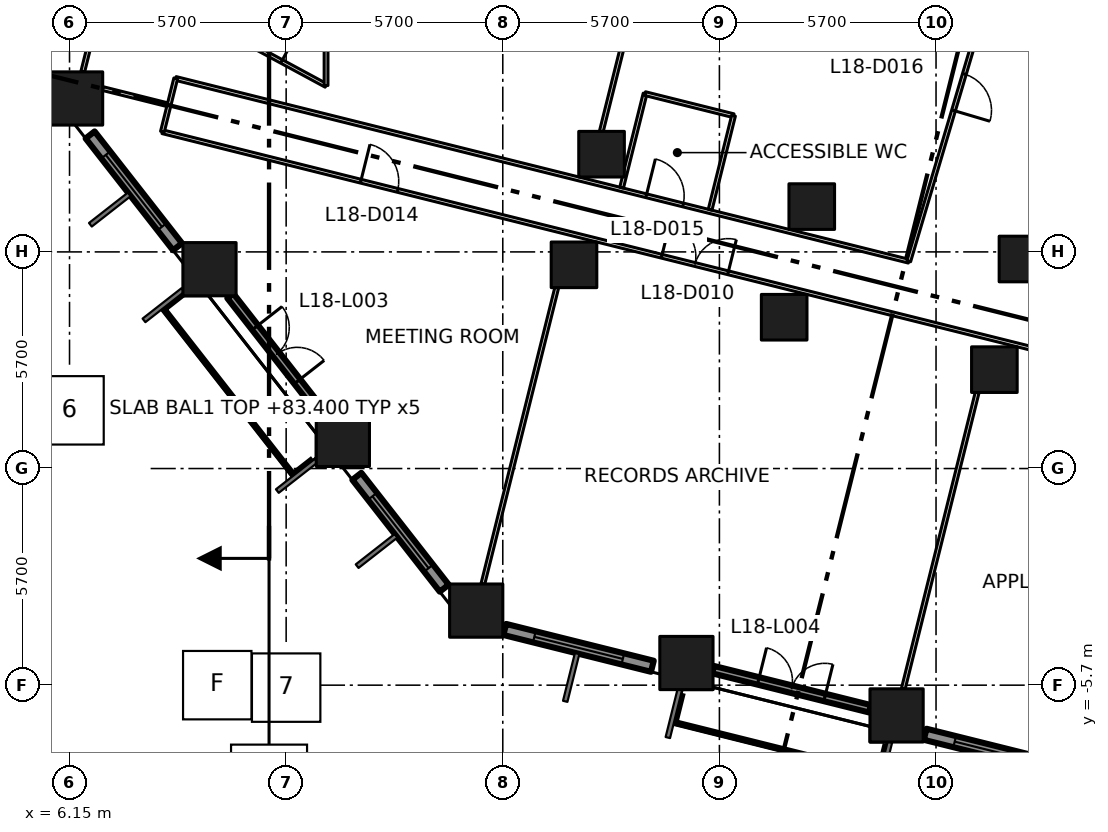
"""IFC4 building model, lengths in metres.
Left out: names, types, materials, properties, quantities, classifications, styles, units other than length and angle.
Written with IfcOpenShell. Run it as: python <this file> out.ifc"""

import sys

from ifc_helpers import new_model, si_unit, direction, frame, frame_2d, origin, origin_2d, place, context, subcontext, project, spatial, rectangle, extrude, element, fill, save


model = new_model("IFC4")
c1 = context("Model", 3, precision=1e-05, world=origin(), true_north=direction((0.0, 1.0)))
c2 = subcontext(c1, "Body", "Model", "MODEL_VIEW")
j1 = project(units=[si_unit("LENGTHUNIT", "METRE"), si_unit("PLANEANGLEUNIT", "RADIAN")], contexts=[c1])
p1 = place(None, origin())
s1 = spatial("IfcSite", under=j1, at=p1, CompositionType="ELEMENT")
p2 = place(p1, origin())
s2 = spatial("IfcBuilding", under=s1, at=p2, CompositionType="ELEMENT")
p3 = place(p2, frame((0.0, 0.0, 83.4)))
s3 = spatial("IfcBuildingStorey", under=s2, at=p3, CompositionType="ELEMENT", Elevation=83.4)
for number, where, z_axis, x_axis in (
    (1, (16.851, -3.738, 0.0), (0.0, 0.0, 1.0), (1.0, 0.0, 0.0)),
    (2, (13.342, 0.754, 0.0), (0.0, 0.0, 1.0), (1.0, 0.0, 0.0)),
    (3, (9.833, 5.245, 0.0), (0.0, 0.0, 1.0), (1.0, 0.0, 0.0)),
    (4, (6.323, 9.737, 0.0), (0.0, 0.0, 1.0), (1.0, 0.0, 0.0)),
    (5, (22.382, -5.117, 0.0), (0.0, 0.0, 1.0), (1.0, 0.0, 0.0)),
    (6, (27.912, -6.496, 0.0), (0.0, 0.0, 1.0), (1.0, 0.0, 0.0)),
):
    element("IfcColumn", number, at=place(p3, frame(where, z_axis=z_axis, x_axis=x_axis)), inside=s3, PredefinedType="COLUMN", context=c2, shape_type="SweptSolid", body=[
        extrude(rectangle(XDim=1.4, YDim=1.4, at=origin_2d()), origin(), (0.0, 0.0, 1.0), 4.2),
    ])
for number, where, z_axis, x_axis in (
    (7, (19.424, 5.36, 0.0), (0.0, 0.0, 1.0), (1.0, 0.0, 0.0)),
    (8, (24.954, 3.981, 0.0), (0.0, 0.0, 1.0), (1.0, 0.0, 0.0)),
    (9, (30.485, 2.602, 0.0), (0.0, 0.0, 1.0), (1.0, 0.0, 0.0)),
    (10, (20.149, 8.271, 0.0), (0.0, 0.0, 1.0), (1.0, 0.0, 0.0)),
    (11, (25.68, 6.892, 0.0), (0.0, 0.0, 1.0), (1.0, 0.0, 0.0)),
    (12, (31.211, 5.513, 0.0), (0.0, 0.0, 1.0), (1.0, 0.0, 0.0)),
):
    element("IfcColumn", number, at=place(p3, frame(where, z_axis=z_axis, x_axis=x_axis)), inside=s3, PredefinedType="COLUMN", context=c2, shape_type="SweptSolid", body=[
        extrude(rectangle(XDim=1.2, YDim=1.2, at=origin_2d()), origin(), (0.0, 0.0, 1.0), 4.2),
    ])
p4 = place(p3, frame((6.692, 8.778, 0.0), z_axis=(0.0, 0.0, 1.0), x_axis=(0.615767067156, -0.787928244833, 0.0)))
e13 = element("IfcWall", 13, at=p4, inside=s3, PredefinedType="SOLIDWALL", context=c2, shape_type="SweptSolid", body=[
    extrude(rectangle(XDim=3.735, YDim=0.3, at=frame_2d((1.868, 0.0))), origin(), (0.0, 0.0, 1.0), 3.1),
])
p5 = place(p4, frame((0.668, 0.0, 0.8)))
e14 = element("IfcOpeningElement", 14, at=p5, cuts=e13, PredefinedType="OPENING", context=c2, shape_type="SweptSolid", body=[
    extrude(rectangle(XDim=2.4, YDim=2.1, at=frame_2d((1.2, 1.05))), frame((0.0, 0.16, 0.0), z_axis=(0.0, -1.0, 0.0), x_axis=(1.0, 0.0, 0.0)), (0.0, 0.0, 1.0), 0.32),
])
p6 = place(p3, frame((10.38, 4.545, 0.0), z_axis=(0.0, 0.0, 1.0), x_axis=(0.615697185896, -0.787982852148, 0.0)))
e15 = element("IfcWall", 15, at=p6, inside=s3, PredefinedType="SOLIDWALL", context=c2, shape_type="SweptSolid", body=[
    extrude(rectangle(XDim=3.922, YDim=0.2, at=frame_2d((1.961, 0.0))), origin(), (0.0, 0.0, 1.0), 3.1),
])
p7 = place(p6, frame((1.061, 0.0, 0.0)))
e16 = element("IfcOpeningElement", 16, at=p7, cuts=e15, PredefinedType="OPENING", context=c2, shape_type="SweptSolid", body=[
    extrude(rectangle(XDim=1.8, YDim=2.9, at=frame_2d((0.9, 1.45))), frame((0.0, 0.11, 0.0), z_axis=(0.0, -1.0, 0.0), x_axis=(1.0, 0.0, 0.0)), (0.0, 0.0, 1.0), 0.22),
])
p8 = place(p3, frame((8.89, 4.292, 0.0), z_axis=(0.0, 0.0, 1.0), x_axis=(0.615636085037, -0.788030590016, 0.0)))
e17 = element("IfcWall", 17, at=p8, inside=s3, PredefinedType="SOLIDWALL", context=c2, shape_type="SweptSolid", body=[
    extrude(rectangle(XDim=5.359, YDim=0.4, at=frame_2d((2.679, 0.0))), origin(), (0.0, 0.0, 1.0), 0.3),
])
p9 = place(p3, frame((13.71, -0.205, 0.0), z_axis=(0.0, 0.0, 1.0), x_axis=(0.615798780214, -0.787903460004, 0.0)))
e18 = element("IfcWall", 18, at=p9, inside=s3, PredefinedType="SOLIDWALL", context=c2, shape_type="SweptSolid", body=[
    extrude(rectangle(XDim=3.735, YDim=0.3, at=frame_2d((1.868, 0.0))), origin(), (0.0, 0.0, 1.0), 3.1),
])
p10 = place(p9, frame((0.667, 0.0, 0.8)))
e19 = element("IfcOpeningElement", 19, at=p10, cuts=e18, PredefinedType="OPENING", context=c2, shape_type="SweptSolid", body=[
    extrude(rectangle(XDim=2.4, YDim=2.1, at=frame_2d((1.2, 1.05))), frame((0.0, 0.16, 0.0), z_axis=(0.0, -1.0, 0.0), x_axis=(1.0, 0.0, 0.0)), (0.0, 0.0, 1.0), 0.32),
])
p11 = place(p3, frame((17.602, -4.234, 0.0), z_axis=(0.0, 0.0, 1.0), x_axis=(0.970260773365, -0.242062040951, 0.0)))
e20 = element("IfcWall", 20, at=p11, inside=s3, PredefinedType="SOLIDWALL", context=c2, shape_type="SweptSolid", body=[
    extrude(rectangle(XDim=4.003, YDim=0.3, at=frame_2d((2.001, 0.0))), origin(), (0.0, 0.0, 1.0), 3.1),
])
p12 = place(p11, frame((0.802, 0.0, 0.8)))
e21 = element("IfcOpeningElement", 21, at=p12, cuts=e20, PredefinedType="OPENING", context=c2, shape_type="SweptSolid", body=[
    extrude(rectangle(XDim=2.4, YDim=2.1, at=frame_2d((1.2, 1.05))), frame((0.0, 0.16, 0.0), z_axis=(0.0, -1.0, 0.0), x_axis=(1.0, 0.0, 0.0)), (0.0, 0.0, 1.0), 0.32),
])
p13 = place(p3, frame((23.082, -5.291, 0.0), z_axis=(0.0, 0.0, 1.0), x_axis=(0.970277311249, -0.241995742265, 0.0)))
e22 = element("IfcWall", 22, at=p13, inside=s3, PredefinedType="SOLIDWALL", context=c2, shape_type="SweptSolid", body=[
    extrude(rectangle(XDim=4.256, YDim=0.2, at=frame_2d((2.128, 0.0))), origin(), (0.0, 0.0, 1.0), 3.1),
])
p14 = place(p13, frame((1.228, 0.0, 0.0)))
e23 = element("IfcOpeningElement", 23, at=p14, cuts=e22, PredefinedType="OPENING", context=c2, shape_type="SweptSolid", body=[
    extrude(rectangle(XDim=1.8, YDim=2.9, at=frame_2d((0.9, 1.45))), frame((0.0, 0.11, 0.0), z_axis=(0.0, -1.0, 0.0), x_axis=(1.0, 0.0, 0.0)), (0.0, 0.0, 1.0), 0.22),
])
p15 = place(p3, frame((22.225, -6.448, 0.0), z_axis=(0.0, 0.0, 1.0), x_axis=(0.970268314528, -0.242031811592, 0.0)))
e24 = element("IfcWall", 24, at=p15, inside=s3, PredefinedType="SOLIDWALL", context=c2, shape_type="SweptSolid", body=[
    extrude(rectangle(XDim=5.359, YDim=0.4, at=frame_2d((2.68, 0.0))), origin(), (0.0, 0.0, 1.0), 0.3),
])
p16 = place(p3, frame((28.663, -6.992, 0.0), z_axis=(0.0, 0.0, 1.0), x_axis=(0.970318045095, -0.24183236211, 0.0)))
e25 = element("IfcWall", 25, at=p16, inside=s3, PredefinedType="SOLIDWALL", context=c2, shape_type="SweptSolid", body=[
    extrude(rectangle(XDim=4.003, YDim=0.3, at=frame_2d((2.001, 0.0))), origin(), (0.0, 0.0, 1.0), 3.1),
])
p17 = place(p16, frame((0.802, 0.0, 0.8)))
e26 = element("IfcOpeningElement", 26, at=p17, cuts=e25, PredefinedType="OPENING", context=c2, shape_type="SweptSolid", body=[
    extrude(rectangle(XDim=2.4, YDim=2.1, at=frame_2d((1.2, 1.05))), frame((0.0, 0.16, 0.0), z_axis=(0.0, -1.0, 0.0), x_axis=(1.0, 0.0, 0.0)), (0.0, 0.0, 1.0), 0.32),
])
p18 = place(p3, frame((8.594, 8.862, 0.0), z_axis=(0.0, 0.0, 1.0), x_axis=(0.970293746648, -0.241929835316, 0.0)))
e27 = element("IfcWall", 27, at=p18, inside=s3, PredefinedType="PARTITIONING", context=c2, shape_type="SweptSolid", body=[
    extrude(rectangle(XDim=68.375, YDim=0.1, at=frame_2d((34.188, 0.0))), origin(), (0.0, 0.0, 1.0), 3.9),
])
p19 = place(p18, frame((40.94, 0.0, 0.0)))
e28 = element("IfcOpeningElement", 28, at=p19, cuts=e27, PredefinedType="OPENING", context=c2, shape_type="SweptSolid", body=[
    extrude(rectangle(XDim=1.8, YDim=2.1, at=frame_2d((0.9, 1.05))), frame((0.0, 0.06, 0.0), z_axis=(0.0, -1.0, 0.0), x_axis=(1.0, 0.0, 0.0)), (0.0, 0.0, 1.0), 0.12),
])
p20 = place(p18, frame((47.941, 0.0, 0.0)))
e29 = element("IfcOpeningElement", 29, at=p20, cuts=e27, PredefinedType="OPENING", context=c2, shape_type="SweptSolid", body=[
    extrude(rectangle(XDim=1.8, YDim=2.1, at=frame_2d((0.9, 1.05))), frame((0.0, 0.06, 0.0), z_axis=(0.0, -1.0, 0.0), x_axis=(1.0, 0.0, 0.0)), (0.0, 0.0, 1.0), 0.12),
])
p21 = place(p18, frame((58.94, 0.0, 0.0)))
e30 = element("IfcOpeningElement", 30, at=p21, cuts=e27, PredefinedType="OPENING", context=c2, shape_type="SweptSolid", body=[
    extrude(rectangle(XDim=1.0, YDim=2.1, at=frame_2d((0.5, 1.05))), frame((0.0, 0.06, 0.0), z_axis=(0.0, -1.0, 0.0), x_axis=(1.0, 0.0, 0.0)), (0.0, 0.0, 1.0), 0.12),
])
p22 = place(p18, frame((13.54, 0.0, 0.0)))
e31 = element("IfcOpeningElement", 31, at=p22, cuts=e27, PredefinedType="OPENING", context=c2, shape_type="SweptSolid", body=[
    extrude(rectangle(XDim=1.8, YDim=2.1, at=frame_2d((0.9, 1.05))), frame((0.0, 0.06, 0.0), z_axis=(0.0, -1.0, 0.0), x_axis=(1.0, 0.0, 0.0)), (0.0, 0.0, 1.0), 0.12),
])
p23 = place(p18, frame((25.24, 0.0, 0.0)))
e32 = element("IfcOpeningElement", 32, at=p23, cuts=e27, PredefinedType="OPENING", context=c2, shape_type="SweptSolid", body=[
    extrude(rectangle(XDim=1.8, YDim=2.1, at=frame_2d((0.9, 1.05))), frame((0.0, 0.06, 0.0), z_axis=(0.0, -1.0, 0.0), x_axis=(1.0, 0.0, 0.0)), (0.0, 0.0, 1.0), 0.12),
])
p24 = place(p18, frame((5.38, 0.0, 0.0)))
e33 = element("IfcOpeningElement", 33, at=p24, cuts=e27, PredefinedType="OPENING", context=c2, shape_type="SweptSolid", body=[
    extrude(rectangle(XDim=1.0, YDim=2.1, at=frame_2d((0.5, 1.05))), frame((0.0, 0.06, 0.0), z_axis=(0.0, -1.0, 0.0), x_axis=(1.0, 0.0, 0.0)), (0.0, 0.0, 1.0), 0.12),
])
p25 = place(p3, frame((8.944, 10.264, 0.0), z_axis=(0.0, 0.0, 1.0), x_axis=(0.970300504447, -0.241902730595, 0.0)))
e34 = element("IfcWall", 34, at=p25, inside=s3, PredefinedType="PARTITIONING", context=c2, shape_type="SweptSolid", body=[
    extrude(rectangle(XDim=19.879, YDim=0.1, at=frame_2d((9.939, 0.0))), origin(), (0.0, 0.0, 1.0), 3.9),
])
p26 = place(p25, frame((12.759, 0.0, 0.0)))
e35 = element("IfcOpeningElement", 35, at=p26, cuts=e34, PredefinedType="OPENING", context=c2, shape_type="SweptSolid", body=[
    extrude(rectangle(XDim=1.0, YDim=2.1, at=frame_2d((0.5, 1.05))), frame((0.0, 0.06, 0.0), z_axis=(0.0, -1.0, 0.0), x_axis=(1.0, 0.0, 0.0)), (0.0, 0.0, 1.0), 0.12),
])
p27 = place(p3, frame((8.944, 10.264, 0.0), z_axis=(0.0, 0.0, 1.0), x_axis=(-0.242297077633, -0.970202105837, 0.0)))
e36 = element("IfcWall", 36, at=p27, inside=s3, PredefinedType="PARTITIONING", context=c2, shape_type="SweptSolid", body=[
    extrude(rectangle(XDim=1.445, YDim=0.1, at=frame_2d((0.722, 0.0))), origin(), (0.0, 0.0, 1.0), 3.9),
])
p28 = place(p3, frame((9.9, 11.7, 0.0), z_axis=(0.0, 0.0, 1.0), x_axis=(0.87965147249, -0.475618846291, 0.0)))
e37 = element("IfcWall", 37, at=p28, inside=s3, PredefinedType="PARTITIONING", context=c2, shape_type="SweptSolid", body=[
    extrude(rectangle(XDim=3.41, YDim=0.1, at=frame_2d((1.705, 0.0))), origin(), (0.0, 0.0, 1.0), 3.9),
])
p29 = place(p28, frame((1.08, 0.0, 0.0)))
e38 = element("IfcOpeningElement", 38, at=p29, cuts=e37, PredefinedType="OPENING", context=c2, shape_type="SweptSolid", body=[
    extrude(rectangle(XDim=1.0, YDim=2.1, at=frame_2d((0.5, 1.05))), frame((0.0, 0.06, 0.0), z_axis=(0.0, -1.0, 0.0), x_axis=(1.0, 0.0, 0.0)), (0.0, 0.0, 1.0), 0.12),
])
p30 = place(p3, frame((12.9, 10.078, 0.0), z_axis=(0.0, 0.0, 1.0), x_axis=(0.0, 1.0, 0.0)))
e39 = element("IfcWall", 39, at=p30, inside=s3, PredefinedType="PARTITIONING", context=c2, shape_type="SweptSolid", body=[
    extrude(rectangle(XDim=4.022, YDim=0.1, at=frame_2d((2.011, 0.0))), origin(), (0.0, 0.0, 1.0), 3.9),
])
p31 = place(p3, frame((30.8, 14.1, 0.0), z_axis=(0.0, 0.0, 1.0), x_axis=(-0.284664373847, -0.95862724469, 0.0)))
e40 = element("IfcWall", 40, at=p31, inside=s3, PredefinedType="PARTITIONING", context=c2, shape_type="SweptSolid", body=[
    extrude(rectangle(XDim=9.018, YDim=0.1, at=frame_2d((4.509, 0.0))), origin(), (0.0, 0.0, 1.0), 3.9),
])
p32 = place(p31, frame((3.88, 0.0, 0.0)))
e41 = element("IfcOpeningElement", 41, at=p32, cuts=e40, PredefinedType="OPENING", context=c2, shape_type="SweptSolid", body=[
    extrude(rectangle(XDim=1.0, YDim=2.1, at=frame_2d((0.5, 1.05))), frame((0.0, 0.06, 0.0), z_axis=(0.0, -1.0, 0.0), x_axis=(1.0, 0.0, 0.0)), (0.0, 0.0, 1.0), 0.12),
])
p33 = place(p3, frame((6.797, 11.638, 0.0), z_axis=(0.0, 0.0, 1.0), x_axis=(-0.242396400943, -0.970177295555, 0.0)))
e42 = element("IfcWall", 42, at=p33, inside=s3, PredefinedType="PARTITIONING", context=c2, shape_type="SweptSolid", body=[
    extrude(rectangle(XDim=1.238, YDim=0.1, at=frame_2d((0.619, 0.0))), origin(), (0.0, 0.0, 1.0), 3.9),
])
p34 = place(p3, frame((8.72, 9.574, 0.0), z_axis=(0.0, 0.0, 1.0), x_axis=(-0.97016712555, 0.242437102155, 0.0)))
e43 = element("IfcWall", 43, at=p34, inside=s3, PredefinedType="PARTITIONING", context=c2, shape_type="SweptSolid", body=[
    extrude(rectangle(XDim=1.749, YDim=0.1, at=frame_2d((0.875, 0.0))), origin(), (0.0, 0.0, 1.0), 3.9),
])
p35 = place(p3, frame((17.026, -3.038, 0.0), z_axis=(0.0, 0.0, 1.0), x_axis=(0.241899423388, 0.970301328951, 0.0)))
e44 = element("IfcWall", 44, at=p35, inside=s3, PredefinedType="PARTITIONING", context=c2, shape_type="SweptSolid", body=[
    extrude(rectangle(XDim=8.037, YDim=0.1, at=frame_2d((4.019, 0.0))), origin(), (0.0, 0.0, 1.0), 3.9),
])
p36 = place(p3, frame((20.143, 8.871, 0.0), z_axis=(0.0, 0.0, 1.0), x_axis=(0.241959975721, 0.970286231042, 0.0)))
e45 = element("IfcWall", 45, at=p36, inside=s3, PredefinedType="PARTITIONING", context=c2, shape_type="SweptSolid", body=[
    extrude(rectangle(XDim=5.389, YDim=0.1, at=frame_2d((2.695, 0.0))), origin(), (0.0, 0.0, 1.0), 3.9),
])
p37 = place(p3, frame((20.677, 7.391, 0.0), z_axis=(0.0, 0.0, 1.0), x_axis=(0.241972320765, 0.970283152478, 0.0)))
e46 = element("IfcWall", 46, at=p37, inside=s3, PredefinedType="PARTITIONING", context=c2, shape_type="SweptSolid", body=[
    extrude(rectangle(XDim=2.55, YDim=0.1, at=frame_2d((1.275, 0.0))), origin(), (0.0, 0.0, 1.0), 3.9),
])
p38 = place(p3, frame((21.294, 9.865, 0.0), z_axis=(0.0, 0.0, 1.0), x_axis=(0.970238184317, -0.242152566975, 0.0)))
e47 = element("IfcWall", 47, at=p38, inside=s3, PredefinedType="PARTITIONING", context=c2, shape_type="SweptSolid", body=[
    extrude(rectangle(XDim=2.4, YDim=0.1, at=frame_2d((1.2, 0.0))), origin(), (0.0, 0.0, 1.0), 3.9),
])
p39 = place(p3, frame((23.622, 9.284, 0.0), z_axis=(0.0, 0.0, 1.0), x_axis=(-0.241611677547, -0.970373019654, 0.0)))
e48 = element("IfcWall", 48, at=p39, inside=s3, PredefinedType="PARTITIONING", context=c2, shape_type="SweptSolid", body=[
    extrude(rectangle(XDim=2.549, YDim=0.1, at=frame_2d((1.275, 0.0))), origin(), (0.0, 0.0, 1.0), 3.9),
])
p40 = place(p3, frame((28.088, -5.796, 0.0), z_axis=(0.0, 0.0, 1.0), x_axis=(0.241906553757, 0.970299551298, 0.0)))
e49 = element("IfcWall", 49, at=p40, inside=s3, PredefinedType="PARTITIONING", context=c2, shape_type="SweptSolid", body=[
    extrude(rectangle(XDim=8.037, YDim=0.1, at=frame_2d((4.018, 0.0))), origin(), (0.0, 0.0, 1.0), 3.9),
])
p41 = place(p5, origin())
e50 = element("IfcWindow", 50, at=p41, inside=s3, PartitioningType="DOUBLE_PANEL_VERTICAL", PredefinedType="WINDOW", context=c2, shape_type="SweptSolid", body=[
    extrude(rectangle(XDim=2.4, YDim=2.1, at=frame_2d((1.2, 1.05))), frame((0.0, 0.03, 0.0), z_axis=(0.0, -1.0, 0.0), x_axis=(1.0, 0.0, 0.0)), (0.0, 0.0, 1.0), 0.06),
])
fill(e14, e50)
p42 = place(p7, origin())
e51 = element("IfcDoor", 51, at=p42, inside=s3, OperationType="DOUBLE_DOOR_SINGLE_SWING", PredefinedType="DOOR", context=c2, shape_type="SweptSolid", body=[
    extrude(rectangle(XDim=1.8, YDim=2.9, at=frame_2d((0.9, 1.45))), frame((0.0, 0.025, 0.0), z_axis=(0.0, -1.0, 0.0), x_axis=(1.0, 0.0, 0.0)), (0.0, 0.0, 1.0), 0.05),
])
fill(e16, e51)
p43 = place(p10, origin())
e52 = element("IfcWindow", 52, at=p43, inside=s3, PartitioningType="DOUBLE_PANEL_VERTICAL", PredefinedType="WINDOW", context=c2, shape_type="SweptSolid", body=[
    extrude(rectangle(XDim=2.4, YDim=2.1, at=frame_2d((1.2, 1.05))), frame((0.0, 0.03, 0.0), z_axis=(0.0, -1.0, 0.0), x_axis=(1.0, 0.0, 0.0)), (0.0, 0.0, 1.0), 0.06),
])
fill(e19, e52)
p44 = place(p12, origin())
e53 = element("IfcWindow", 53, at=p44, inside=s3, PartitioningType="DOUBLE_PANEL_VERTICAL", PredefinedType="WINDOW", context=c2, shape_type="SweptSolid", body=[
    extrude(rectangle(XDim=2.4, YDim=2.1, at=frame_2d((1.2, 1.05))), frame((0.0, 0.03, 0.0), z_axis=(0.0, -1.0, 0.0), x_axis=(1.0, 0.0, 0.0)), (0.0, 0.0, 1.0), 0.06),
])
fill(e21, e53)
p45 = place(p14, origin())
e54 = element("IfcDoor", 54, at=p45, inside=s3, OperationType="DOUBLE_DOOR_SINGLE_SWING", PredefinedType="DOOR", context=c2, shape_type="SweptSolid", body=[
    extrude(rectangle(XDim=1.8, YDim=2.9, at=frame_2d((0.9, 1.45))), frame((0.0, 0.025, 0.0), z_axis=(0.0, -1.0, 0.0), x_axis=(1.0, 0.0, 0.0)), (0.0, 0.0, 1.0), 0.05),
])
fill(e23, e54)
p46 = place(p17, origin())
e55 = element("IfcWindow", 55, at=p46, inside=s3, PartitioningType="DOUBLE_PANEL_VERTICAL", PredefinedType="WINDOW", context=c2, shape_type="SweptSolid", body=[
    extrude(rectangle(XDim=2.4, YDim=2.1, at=frame_2d((1.2, 1.05))), frame((0.0, 0.03, 0.0), z_axis=(0.0, -1.0, 0.0), x_axis=(1.0, 0.0, 0.0)), (0.0, 0.0, 1.0), 0.06),
])
fill(e26, e55)
p47 = place(p22, origin())
e56 = element("IfcDoor", 56, at=p47, inside=s3, OperationType="DOUBLE_DOOR_SINGLE_SWING", PredefinedType="DOOR", context=c2, shape_type="SweptSolid", body=[
    extrude(rectangle(XDim=1.8, YDim=2.1, at=frame_2d((0.9, 1.05))), frame((0.0, 0.025, 0.0), z_axis=(0.0, -1.0, 0.0), x_axis=(1.0, 0.0, 0.0)), (0.0, 0.0, 1.0), 0.05),
])
fill(e31, e56)
p48 = place(p29, origin())
e57 = element("IfcDoor", 57, at=p48, inside=s3, OperationType="SINGLE_SWING_RIGHT", PredefinedType="DOOR", context=c2, shape_type="SweptSolid", body=[
    extrude(rectangle(XDim=1.0, YDim=2.1, at=frame_2d((0.5, 1.05))), frame((0.0, 0.025, 0.0), z_axis=(0.0, -1.0, 0.0), x_axis=(1.0, 0.0, 0.0)), (0.0, 0.0, 1.0), 0.05),
])
fill(e38, e57)
p49 = place(p24, origin())
e58 = element("IfcDoor", 58, at=p49, inside=s3, OperationType="SINGLE_SWING_LEFT", PredefinedType="DOOR", context=c2, shape_type="SweptSolid", body=[
    extrude(rectangle(XDim=1.0, YDim=2.1, at=frame_2d((0.5, 1.05))), frame((0.0, 0.025, 0.0), z_axis=(0.0, -1.0, 0.0), x_axis=(1.0, 0.0, 0.0)), (0.0, 0.0, 1.0), 0.05),
])
fill(e33, e58)
p50 = place(p26, origin())
e59 = element("IfcDoor", 59, at=p50, inside=s3, OperationType="SINGLE_SWING_LEFT", PredefinedType="DOOR", context=c2, shape_type="SweptSolid", body=[
    extrude(rectangle(XDim=1.0, YDim=2.1, at=frame_2d((0.5, 1.05))), frame((0.0, 0.025, 0.0), z_axis=(0.0, -1.0, 0.0), x_axis=(1.0, 0.0, 0.0)), (0.0, 0.0, 1.0), 0.05),
])
fill(e35, e59)
p51 = place(p32, origin())
e60 = element("IfcDoor", 60, at=p51, inside=s3, OperationType="SINGLE_SWING_RIGHT", PredefinedType="DOOR", context=c2, shape_type="SweptSolid", body=[
    extrude(rectangle(XDim=1.0, YDim=2.1, at=frame_2d((0.5, 1.05))), frame((0.0, 0.025, 0.0), z_axis=(0.0, -1.0, 0.0), x_axis=(1.0, 0.0, 0.0)), (0.0, 0.0, 1.0), 0.05),
])
fill(e41, e60)
save(model, sys.argv[1])
